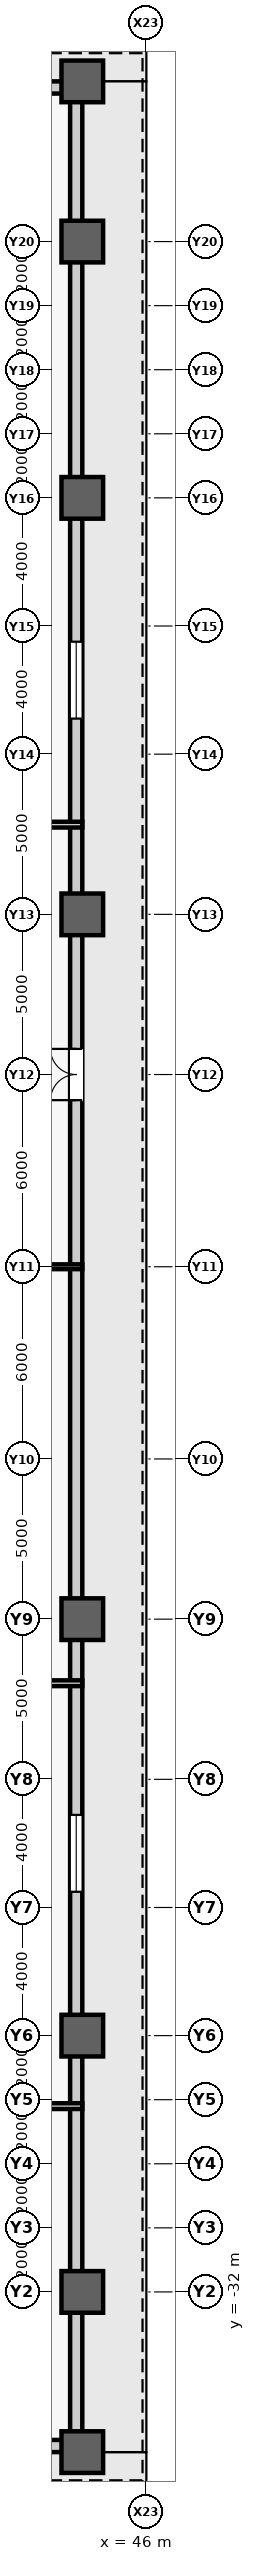
"""IFC4 building model, lengths in metres.
Left out: names, types, materials, properties, quantities, classifications, styles, units other than length and angle.
Written with IfcOpenShell. Run it as: python <this file> out.ifc"""

import sys

from ifc_helpers import new_model, si_unit, direction, frame, frame_2d, origin, origin_2d, place, context, subcontext, project, spatial, rectangle, extrude, source, transform, mapped, element, fill, save


model = new_model("IFC4")
c1 = context("Model", 3, precision=1e-05, world=origin(), true_north=direction((0.0, 1.0)))
c2 = subcontext(c1, "Body", "Model", "MODEL_VIEW")
j1 = project(units=[si_unit("LENGTHUNIT", "METRE"), si_unit("PLANEANGLEUNIT", "RADIAN")], contexts=[c1])
p1 = place(None, origin())
s1 = spatial("IfcSite", under=j1, at=p1, CompositionType="ELEMENT")
p2 = place(p1, origin())
s2 = spatial("IfcBuilding", under=s1, at=p2, CompositionType="ELEMENT")
p3 = place(p2, frame((0.0, 0.0, 6.6)))
s3 = spatial("IfcBuildingStorey", under=s2, at=p3, CompositionType="ELEMENT", Elevation=6.6)
m1 = source(origin(), c2, "Body", "SweptSolid", [
    extrude(rectangle(XDim=1.3, YDim=1.3, at=origin_2d()), origin(), (0.0, 0.0, 1.0), 5.4),
])
for number, where, z_axis, x_axis in (
    (1, (44.0, -37.0, 0.0), (0.0, 0.0, 1.0), (1.0, 0.0, 0.0)),
    (2, (44.0, -24.0, 0.0), (0.0, 0.0, 1.0), (1.0, 0.0, 0.0)),
    (3, (44.0, -11.0, 0.0), (0.0, 0.0, 1.0), (1.0, 0.0, 0.0)),
    (4, (44.0, 11.0, 0.0), (0.0, 0.0, 1.0), (1.0, 0.0, 0.0)),
    (5, (44.0, 24.0, 0.0), (0.0, 0.0, 1.0), (1.0, 0.0, 0.0)),
    (6, (44.0, 37.0, 0.0), (0.0, 0.0, 1.0), (1.0, 0.0, 0.0)),
    (7, (44.0, -32.0, 0.0), (0.0, 0.0, 1.0), (1.0, 0.0, 0.0)),
    (8, (44.0, 32.0, 0.0), (0.0, 0.0, 1.0), (1.0, 0.0, 0.0)),
):
    element("IfcColumn", number, at=place(p3, frame(where, z_axis=z_axis, x_axis=x_axis)), inside=s3, PredefinedType="COLUMN", context=c2, shape_type="MappedRepresentation", body=[
        mapped(m1, transform((0.0, 0.0, 0.0), scale=1.0)),
    ])
m2 = source(origin(), c2, "Body", "SweptSolid", [
    extrude(rectangle(XDim=34.0, YDim=0.38, at=frame_2d((17.0, 0.0))), origin(), (0.0, 0.0, 1.0), 3.28),
])
p4 = place(p3, frame((10.0, -36.81, 0.0), z_axis=(0.0, 0.0, 1.0), x_axis=(1.0, 0.0, 0.0)))
e9 = element("IfcWall", 9, at=p4, inside=s3, PredefinedType="STANDARD", context=c2, shape_type="MappedRepresentation", body=[
    mapped(m2, transform((0.0, 0.0, 0.0), scale=1.0)),
])
m3 = source(origin(), c2, "Body", "SweptSolid", [
    extrude(rectangle(XDim=2.4, YDim=2.56, at=frame_2d((1.2, 1.28))), frame((0.0, 0.2, 0.0), z_axis=(0.0, -1.0, 0.0), x_axis=(1.0, 0.0, 0.0)), (0.0, 0.0, 1.0), 0.4),
])
p5 = place(p4, frame((7.3, 0.0, 0.5)))
e10 = element("IfcOpeningElement", 10, at=p5, cuts=e9, PredefinedType="OPENING", context=c2, shape_type="MappedRepresentation", body=[
    mapped(m3, transform((0.0, 0.0, 0.0), scale=1.0)),
])
p6 = place(p4, frame((15.8, 0.0, 0.5)))
e11 = element("IfcOpeningElement", 11, at=p6, cuts=e9, PredefinedType="OPENING", context=c2, shape_type="MappedRepresentation", body=[
    mapped(m3, transform((0.0, 0.0, 0.0), scale=1.0)),
])
p7 = place(p4, frame((24.3, 0.0, 0.5)))
e12 = element("IfcOpeningElement", 12, at=p7, cuts=e9, PredefinedType="OPENING", context=c2, shape_type="MappedRepresentation", body=[
    mapped(m3, transform((0.0, 0.0, 0.0), scale=1.0)),
])
p8 = place(p3, frame((10.0, 36.81, 0.0), z_axis=(0.0, 0.0, 1.0), x_axis=(1.0, 0.0, 0.0)))
e13 = element("IfcWall", 13, at=p8, inside=s3, PredefinedType="STANDARD", context=c2, shape_type="MappedRepresentation", body=[
    mapped(m2, transform((0.0, 0.0, 0.0), scale=1.0)),
])
p9 = place(p8, frame((7.3, 0.0, 0.5)))
e14 = element("IfcOpeningElement", 14, at=p9, cuts=e13, PredefinedType="OPENING", context=c2, shape_type="MappedRepresentation", body=[
    mapped(m3, transform((0.0, 0.0, 0.0), scale=1.0)),
])
p10 = place(p8, frame((15.8, 0.0, 0.5)))
e15 = element("IfcOpeningElement", 15, at=p10, cuts=e13, PredefinedType="OPENING", context=c2, shape_type="MappedRepresentation", body=[
    mapped(m3, transform((0.0, 0.0, 0.0), scale=1.0)),
])
p11 = place(p8, frame((24.3, 0.0, 0.5)))
e16 = element("IfcOpeningElement", 16, at=p11, cuts=e13, PredefinedType="OPENING", context=c2, shape_type="MappedRepresentation", body=[
    mapped(m3, transform((0.0, 0.0, 0.0), scale=1.0)),
])
m4 = source(origin(), c2, "Body", "SweptSolid", [
    extrude(rectangle(XDim=73.24, YDim=0.38, at=frame_2d((36.62, 0.0))), origin(), (0.0, 0.0, 1.0), 3.28),
])
p12 = place(p3, frame((43.81, -36.62, 0.0), z_axis=(0.0, 0.0, 1.0), x_axis=(0.0, 1.0, 0.0)))
e17 = element("IfcWall", 17, at=p12, inside=s3, PredefinedType="STANDARD", context=c2, shape_type="MappedRepresentation", body=[
    mapped(m4, transform((0.0, 0.0, 0.0), scale=1.0)),
])
m5 = source(origin(), c2, "Body", "SweptSolid", [
    extrude(rectangle(XDim=1.6, YDim=2.25, at=frame_2d((0.8, 1.125))), frame((0.0, 0.2, 0.0), z_axis=(0.0, -1.0, 0.0), x_axis=(1.0, 0.0, 0.0)), (0.0, 0.0, 1.0), 0.4),
])
p13 = place(p12, frame((41.82, 0.0, 0.0)))
e18 = element("IfcOpeningElement", 18, at=p13, cuts=e17, PredefinedType="OPENING", context=c2, shape_type="MappedRepresentation", body=[
    mapped(m5, transform((0.0, 0.0, 0.0), scale=1.0)),
])
p14 = place(p12, frame((17.11, 0.0, 0.5)))
e19 = element("IfcOpeningElement", 19, at=p14, cuts=e17, PredefinedType="OPENING", context=c2, shape_type="MappedRepresentation", body=[
    mapped(m3, transform((0.0, 0.0, 0.0), scale=1.0)),
])
p15 = place(p12, frame((53.73, 0.0, 0.5)))
e20 = element("IfcOpeningElement", 20, at=p15, cuts=e17, PredefinedType="OPENING", context=c2, shape_type="MappedRepresentation", body=[
    mapped(m3, transform((0.0, 0.0, 0.0), scale=1.0)),
])
m6 = source(origin(), c2, "Body", "SweptSolid", [
    extrude(rectangle(XDim=88.0, YDim=0.18, at=frame_2d((44.0, 0.0))), origin(), (0.0, 0.0, 1.0), 5.08),
])
p16 = place(p3, frame((-44.0, -26.2, 0.0), z_axis=(0.0, 0.0, 1.0), x_axis=(1.0, 0.0, 0.0)))
e21 = element("IfcWall", 21, at=p16, inside=s3, PredefinedType="PARTITIONING", context=c2, shape_type="MappedRepresentation", body=[
    mapped(m6, transform((0.0, 0.0, 0.0), scale=1.0)),
])
m7 = source(origin(), c2, "Body", "SweptSolid", [
    extrude(rectangle(XDim=1.05, YDim=2.2, at=frame_2d((0.525, 1.1))), frame((0.0, 0.1, 0.0), z_axis=(0.0, -1.0, 0.0), x_axis=(1.0, 0.0, 0.0)), (0.0, 0.0, 1.0), 0.2),
])
p17 = place(p16, frame((18.725, 0.0, 0.0)))
e22 = element("IfcOpeningElement", 22, at=p17, cuts=e21, PredefinedType="OPENING", context=c2, shape_type="MappedRepresentation", body=[
    mapped(m7, transform((0.0, 0.0, 0.0), scale=1.0)),
])
p18 = place(p16, frame((35.475, 0.0, 0.0)))
e23 = element("IfcOpeningElement", 23, at=p18, cuts=e21, PredefinedType="OPENING", context=c2, shape_type="MappedRepresentation", body=[
    mapped(m7, transform((0.0, 0.0, 0.0), scale=1.0)),
])
p19 = place(p16, frame((60.225, 0.0, 0.0)))
e24 = element("IfcOpeningElement", 24, at=p19, cuts=e21, PredefinedType="OPENING", context=c2, shape_type="MappedRepresentation", body=[
    mapped(m7, transform((0.0, 0.0, 0.0), scale=1.0)),
])
p20 = place(p3, frame((-44.0, 13.8, 0.0), z_axis=(0.0, 0.0, 1.0), x_axis=(1.0, 0.0, 0.0)))
e25 = element("IfcWall", 25, at=p20, inside=s3, PredefinedType="PARTITIONING", context=c2, shape_type="MappedRepresentation", body=[
    mapped(m6, transform((0.0, 0.0, 0.0), scale=1.0)),
])
p21 = place(p20, frame((22.725, 0.0, 0.0)))
e26 = element("IfcOpeningElement", 26, at=p21, cuts=e25, PredefinedType="OPENING", context=c2, shape_type="MappedRepresentation", body=[
    mapped(m7, transform((0.0, 0.0, 0.0), scale=1.0)),
])
p22 = place(p20, frame((44.475, 0.0, 0.0)))
e27 = element("IfcOpeningElement", 27, at=p22, cuts=e25, PredefinedType="OPENING", context=c2, shape_type="MappedRepresentation", body=[
    mapped(m7, transform((0.0, 0.0, 0.0), scale=1.0)),
])
p23 = place(p20, frame((65.225, 0.0, 0.0)))
e28 = element("IfcOpeningElement", 28, at=p23, cuts=e25, PredefinedType="OPENING", context=c2, shape_type="MappedRepresentation", body=[
    mapped(m7, transform((0.0, 0.0, 0.0), scale=1.0)),
])
m8 = source(origin(), c2, "Body", "SweptSolid", [
    extrude(rectangle(XDim=25.8, YDim=0.18, at=frame_2d((12.9, 0.0))), origin(), (0.0, 0.0, 1.0), 5.08),
])
p24 = place(p3, frame((18.2, -13.0, 0.0), z_axis=(0.0, 0.0, 1.0), x_axis=(1.0, 0.0, 0.0)))
e29 = element("IfcWall", 29, at=p24, inside=s3, PredefinedType="PARTITIONING", context=c2, shape_type="MappedRepresentation", body=[
    mapped(m8, transform((0.0, 0.0, 0.0), scale=1.0)),
])
m9 = source(origin(), c2, "Body", "SweptSolid", [
    extrude(rectangle(XDim=25.8, YDim=0.15, at=frame_2d((12.9, 0.0))), origin(), (0.0, 0.0, 1.0), 3.28),
])
p25 = place(p3, frame((18.2, 0.0, 0.0), z_axis=(0.0, 0.0, 1.0), x_axis=(1.0, 0.0, 0.0)))
e30 = element("IfcWall", 30, at=p25, inside=s3, PredefinedType="PARTITIONING", context=c2, shape_type="MappedRepresentation", body=[
    mapped(m9, transform((0.0, 0.0, 0.0), scale=1.0)),
])
m10 = source(origin(), c2, "Body", "SweptSolid", [
    extrude(rectangle(XDim=1.6, YDim=2.25, at=frame_2d((0.8, 1.125))), frame((0.0, 0.025, 0.0), z_axis=(0.0, -1.0, 0.0), x_axis=(1.0, 0.0, 0.0)), (0.0, 0.0, 1.0), 0.05),
])
p26 = place(p13, origin())
e31 = element("IfcDoor", 31, at=p26, inside=s3, OperationType="DOUBLE_DOOR_SINGLE_SWING", PredefinedType="DOOR", context=c2, shape_type="MappedRepresentation", body=[
    mapped(m10, transform((0.0, 0.0, 0.0), scale=1.0)),
])
fill(e18, e31)
m11 = source(origin(), c2, "Body", "SweptSolid", [
    extrude(rectangle(XDim=2.4, YDim=2.56, at=frame_2d((1.2, 1.28))), frame((0.0, 0.03, 0.0), z_axis=(0.0, -1.0, 0.0), x_axis=(1.0, 0.0, 0.0)), (0.0, 0.0, 1.0), 0.06),
])
p27 = place(p14, origin())
e32 = element("IfcWindow", 32, at=p27, inside=s3, PartitioningType="SINGLE_PANEL", PredefinedType="WINDOW", context=c2, shape_type="MappedRepresentation", body=[
    mapped(m11, transform((0.0, 0.0, 0.0), scale=1.0)),
])
fill(e19, e32)
p28 = place(p15, origin())
e33 = element("IfcWindow", 33, at=p28, inside=s3, PartitioningType="SINGLE_PANEL", PredefinedType="WINDOW", context=c2, shape_type="MappedRepresentation", body=[
    mapped(m11, transform((0.0, 0.0, 0.0), scale=1.0)),
])
fill(e20, e33)
save(model, sys.argv[1])
